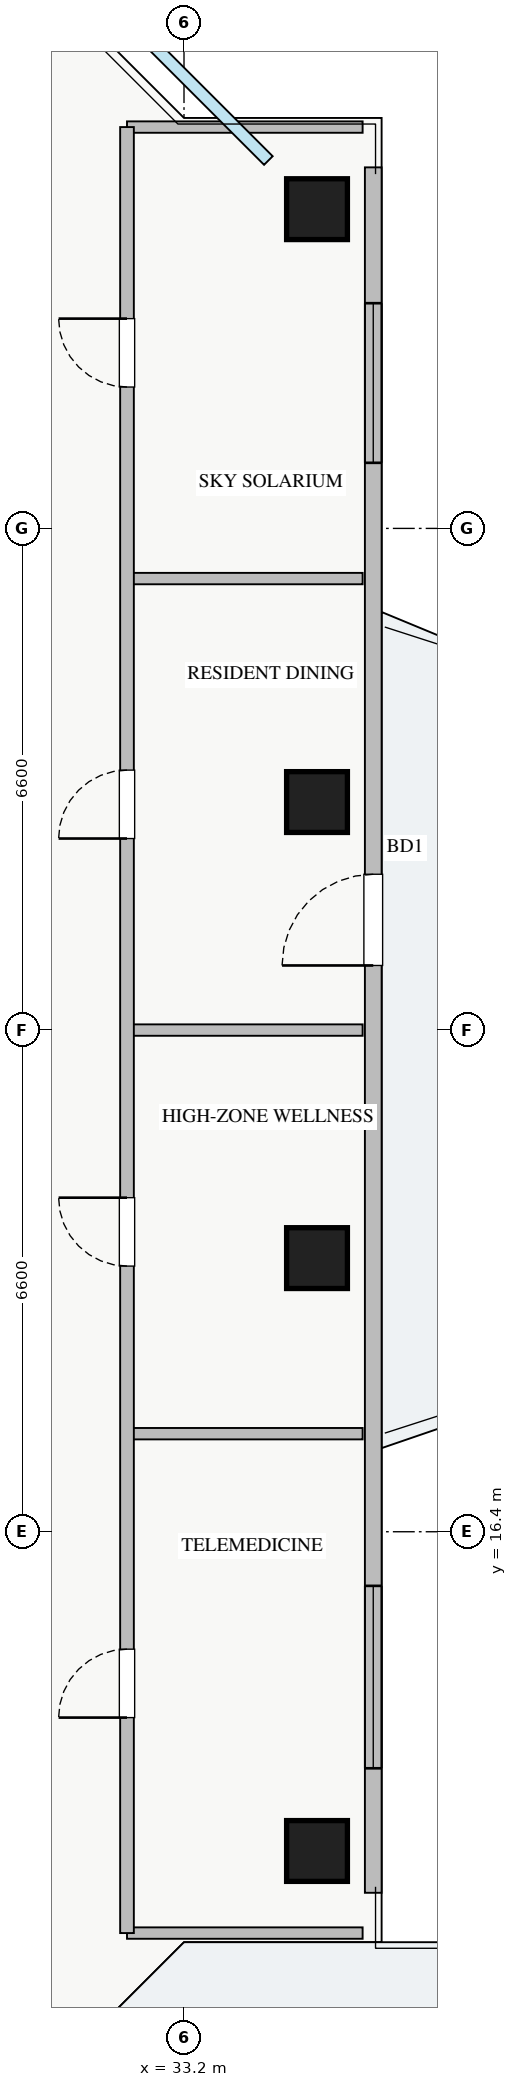
"""IFC4 building model, lengths in metres.
Left out: names, types, materials, properties, quantities, classifications, styles, units other than length and angle.
Written with IfcOpenShell. Run it as: python <this file> out.ifc"""

import sys

from ifc_helpers import new_model, si_unit, direction, frame, frame_2d, origin, origin_2d, place, context, subcontext, project, spatial, rectangle, extrude, source, transform, mapped, element, fill, save


model = new_model("IFC4")
c1 = context("Model", 3, precision=1e-05, world=origin(), true_north=direction((0.0, 1.0)))
c2 = subcontext(c1, "Body", "Model", "MODEL_VIEW")
j1 = project(units=[si_unit("LENGTHUNIT", "METRE"), si_unit("PLANEANGLEUNIT", "RADIAN")], contexts=[c1])
p1 = place(None, origin())
s1 = spatial("IfcSite", under=j1, at=p1, CompositionType="ELEMENT")
p2 = place(p1, origin())
s2 = spatial("IfcBuilding", under=s1, at=p2, CompositionType="ELEMENT")
p3 = place(p2, frame((0.0, 0.0, 213.25)))
s3 = spatial("IfcBuildingStorey", under=s2, at=p3, CompositionType="ELEMENT", Elevation=213.25)
m1 = source(origin(), c2, "Body", "SweptSolid", [
    extrude(rectangle(XDim=0.8, YDim=0.8, at=origin_2d()), origin(), (0.0, 0.0, 1.0), 3.25),
])
for number, where, z_axis, x_axis in (
    (1, (34.95, 12.2, 0.0), (0.0, 0.0, 1.0), (1.0, 0.0, 0.0)),
    (2, (34.95, 20.0, 0.0), (0.0, 0.0, 1.0), (1.0, 0.0, 0.0)),
    (3, (34.95, 26.0, 0.0), (0.0, 0.0, 1.0), (1.0, 0.0, 0.0)),
    (4, (34.95, 33.8, 0.0), (0.0, 0.0, 1.0), (1.0, 0.0, 0.0)),
):
    element("IfcColumn", number, at=place(p3, frame(where, z_axis=z_axis, x_axis=x_axis)), inside=s3, PredefinedType="COLUMN", context=c2, shape_type="MappedRepresentation", body=[
        mapped(m1, transform((0.0, 0.0, 0.0), x_axis=(1.0, 0.0, 0.0), y_axis=(0.0, 1.0, 0.0), z_axis=(0.0, 0.0, 1.0), scale=1.0)),
    ])
p4 = place(p3, frame((35.69, 11.65, 0.0), z_axis=(0.0, 0.0, 1.0), x_axis=(0.0, 1.0, 0.0)))
e5 = element("IfcWall", 5, at=p4, inside=s3, PredefinedType="STANDARD", context=c2, shape_type="SweptSolid", body=[
    extrude(rectangle(XDim=22.7, YDim=0.22, at=frame_2d((11.35, 0.0))), origin(), (0.0, 0.0, 1.0), 2.61),
])
p5 = place(p4, frame((12.2, 0.0, 0.0)))
e6 = element("IfcOpeningElement", 6, at=p5, cuts=e5, PredefinedType="OPENING", context=c2, shape_type="SweptSolid", body=[
    extrude(rectangle(XDim=1.2, YDim=2.1, at=frame_2d((0.6, 1.05))), frame((0.0, 0.12, 0.0), z_axis=(0.0, -1.0, 0.0), x_axis=(1.0, 0.0, 0.0)), (0.0, 0.0, 1.0), 0.24),
])
p6 = place(p4, frame((1.638, 0.0, 0.9)))
e7 = element("IfcOpeningElement", 7, at=p6, cuts=e5, PredefinedType="OPENING", context=c2, shape_type="SweptSolid", body=[
    extrude(rectangle(XDim=2.4, YDim=1.48, at=frame_2d((1.2, 0.74))), frame((0.0, 0.12, 0.0), z_axis=(0.0, -1.0, 0.0), x_axis=(1.0, 0.0, 0.0)), (0.0, 0.0, 1.0), 0.24),
])
p7 = place(p4, frame((18.813, 0.0, 0.9)))
e8 = element("IfcOpeningElement", 8, at=p7, cuts=e5, PredefinedType="OPENING", context=c2, shape_type="SweptSolid", body=[
    extrude(rectangle(XDim=2.1, YDim=1.48, at=frame_2d((1.05, 0.74))), frame((0.0, 0.12, 0.0), z_axis=(0.0, -1.0, 0.0), x_axis=(1.0, 0.0, 0.0)), (0.0, 0.0, 1.0), 0.24),
])
for number, where, z_axis, x_axis in (
    (9, (32.45, 34.88, 0.0), (0.0, 0.0, 1.0), (1.0, 0.0, 0.0)),
    (10, (32.45, 11.12, 0.0), (0.0, 0.0, 1.0), (1.0, 0.0, 0.0)),
    (11, (32.45, 17.69, 0.0), (0.0, 0.0, 1.0), (1.0, 0.0, 0.0)),
    (12, (32.45, 23.0, 0.0), (0.0, 0.0, 1.0), (1.0, 0.0, 0.0)),
    (13, (32.45, 28.94, 0.0), (0.0, 0.0, 1.0), (1.0, 0.0, 0.0)),
):
    element("IfcWall", number, at=place(p3, frame(where, z_axis=z_axis, x_axis=x_axis)), inside=s3, PredefinedType="PARTITIONING", context=c2, shape_type="SweptSolid", body=[
        extrude(rectangle(XDim=3.1, YDim=0.15, at=frame_2d((1.55, 0.0))), origin(), (0.0, 0.0, 1.0), 3.07),
    ])
p8 = place(p3, frame((32.45, 11.12, 0.0), z_axis=(0.0, 0.0, 1.0), x_axis=(0.0, 1.0, 0.0)))
e14 = element("IfcWall", 14, at=p8, inside=s3, PredefinedType="PARTITIONING", context=c2, shape_type="SweptSolid", body=[
    extrude(rectangle(XDim=23.76, YDim=0.18, at=frame_2d((11.88, 0.0))), origin(), (0.0, 0.0, 1.0), 3.07),
])
p9 = place(p8, frame((2.835, 0.0, 0.0)))
e15 = element("IfcOpeningElement", 15, at=p9, cuts=e14, PredefinedType="OPENING", context=c2, shape_type="SweptSolid", body=[
    extrude(rectangle(XDim=0.9, YDim=2.05, at=frame_2d((0.45, 1.025))), frame((0.0, 0.1, 0.0), z_axis=(0.0, -1.0, 0.0), x_axis=(1.0, 0.0, 0.0)), (0.0, 0.0, 1.0), 0.2),
])
p10 = place(p8, frame((8.775, 0.0, 0.0)))
e16 = element("IfcOpeningElement", 16, at=p10, cuts=e14, PredefinedType="OPENING", context=c2, shape_type="SweptSolid", body=[
    extrude(rectangle(XDim=0.9, YDim=2.05, at=frame_2d((0.45, 1.025))), frame((0.0, 0.1, 0.0), z_axis=(0.0, -1.0, 0.0), x_axis=(1.0, 0.0, 0.0)), (0.0, 0.0, 1.0), 0.2),
])
p11 = place(p8, frame((14.4, 0.0, 0.0)))
e17 = element("IfcOpeningElement", 17, at=p11, cuts=e14, PredefinedType="OPENING", context=c2, shape_type="SweptSolid", body=[
    extrude(rectangle(XDim=0.9, YDim=2.05, at=frame_2d((0.45, 1.025))), frame((0.0, 0.1, 0.0), z_axis=(0.0, -1.0, 0.0), x_axis=(1.0, 0.0, 0.0)), (0.0, 0.0, 1.0), 0.2),
])
p12 = place(p8, frame((20.34, 0.0, 0.0)))
e18 = element("IfcOpeningElement", 18, at=p12, cuts=e14, PredefinedType="OPENING", context=c2, shape_type="SweptSolid", body=[
    extrude(rectangle(XDim=0.9, YDim=2.05, at=frame_2d((0.45, 1.025))), frame((0.0, 0.1, 0.0), z_axis=(0.0, -1.0, 0.0), x_axis=(1.0, 0.0, 0.0)), (0.0, 0.0, 1.0), 0.2),
])
m2 = source(origin(), c2, "Body", "SweptSolid", [
    extrude(rectangle(XDim=1.2, YDim=2.1, at=frame_2d((0.6, 1.05))), frame((0.0, 0.025, 0.0), z_axis=(0.0, -1.0, 0.0), x_axis=(1.0, 0.0, 0.0)), (0.0, 0.0, 1.0), 0.05),
])
p13 = place(p5, origin())
e19 = element("IfcDoor", 19, at=p13, inside=s3, OperationType="SINGLE_SWING_LEFT", PredefinedType="DOOR", context=c2, shape_type="MappedRepresentation", body=[
    mapped(m2, transform((0.0, 0.0, 0.0), x_axis=(1.0, 0.0, 0.0), y_axis=(0.0, 1.0, 0.0), z_axis=(0.0, 0.0, 1.0), scale=1.0)),
])
fill(e6, e19)
m3 = source(origin(), c2, "Body", "SweptSolid", [
    extrude(rectangle(XDim=2.4, YDim=1.48, at=frame_2d((1.2, 0.74))), frame((0.0, 0.03, 0.0), z_axis=(0.0, -1.0, 0.0), x_axis=(1.0, 0.0, 0.0)), (0.0, 0.0, 1.0), 0.06),
])
p14 = place(p6, origin())
e20 = element("IfcWindow", 20, at=p14, inside=s3, PartitioningType="TRIPLE_PANEL_VERTICAL", PredefinedType="WINDOW", context=c2, shape_type="MappedRepresentation", body=[
    mapped(m3, transform((0.0, 0.0, 0.0), x_axis=(1.0, 0.0, 0.0), y_axis=(0.0, 1.0, 0.0), z_axis=(0.0, 0.0, 1.0), scale=1.0)),
])
fill(e7, e20)
m4 = source(origin(), c2, "Body", "SweptSolid", [
    extrude(rectangle(XDim=2.1, YDim=1.48, at=frame_2d((1.05, 0.74))), frame((0.0, 0.03, 0.0), z_axis=(0.0, -1.0, 0.0), x_axis=(1.0, 0.0, 0.0)), (0.0, 0.0, 1.0), 0.06),
])
p15 = place(p7, origin())
e21 = element("IfcWindow", 21, at=p15, inside=s3, PartitioningType="TRIPLE_PANEL_VERTICAL", PredefinedType="WINDOW", context=c2, shape_type="MappedRepresentation", body=[
    mapped(m4, transform((0.0, 0.0, 0.0), x_axis=(1.0, 0.0, 0.0), y_axis=(0.0, 1.0, 0.0), z_axis=(0.0, 0.0, 1.0), scale=1.0)),
])
fill(e8, e21)
m5 = source(origin(), c2, "Body", "SweptSolid", [
    extrude(rectangle(XDim=0.9, YDim=2.05, at=frame_2d((0.45, 1.025))), frame((0.0, 0.025, 0.0), z_axis=(0.0, -1.0, 0.0), x_axis=(1.0, 0.0, 0.0)), (0.0, 0.0, 1.0), 0.05),
])
p16 = place(p9, origin())
e22 = element("IfcDoor", 22, at=p16, inside=s3, OperationType="SINGLE_SWING_LEFT", PredefinedType="DOOR", context=c2, shape_type="MappedRepresentation", body=[
    mapped(m5, transform((0.0, 0.0, 0.0), x_axis=(1.0, 0.0, 0.0), y_axis=(0.0, 1.0, 0.0), z_axis=(0.0, 0.0, 1.0), scale=1.0)),
])
fill(e15, e22)
p17 = place(p10, origin())
e23 = element("IfcDoor", 23, at=p17, inside=s3, OperationType="SINGLE_SWING_RIGHT", PredefinedType="DOOR", context=c2, shape_type="MappedRepresentation", body=[
    mapped(m5, transform((0.0, 0.0, 0.0), x_axis=(1.0, 0.0, 0.0), y_axis=(0.0, 1.0, 0.0), z_axis=(0.0, 0.0, 1.0), scale=1.0)),
])
fill(e16, e23)
p18 = place(p11, origin())
e24 = element("IfcDoor", 24, at=p18, inside=s3, OperationType="SINGLE_SWING_LEFT", PredefinedType="DOOR", context=c2, shape_type="MappedRepresentation", body=[
    mapped(m5, transform((0.0, 0.0, 0.0), x_axis=(1.0, 0.0, 0.0), y_axis=(0.0, 1.0, 0.0), z_axis=(0.0, 0.0, 1.0), scale=1.0)),
])
fill(e17, e24)
p19 = place(p12, origin())
e25 = element("IfcDoor", 25, at=p19, inside=s3, OperationType="SINGLE_SWING_RIGHT", PredefinedType="DOOR", context=c2, shape_type="MappedRepresentation", body=[
    mapped(m5, transform((0.0, 0.0, 0.0), x_axis=(1.0, 0.0, 0.0), y_axis=(0.0, 1.0, 0.0), z_axis=(0.0, 0.0, 1.0), scale=1.0)),
])
fill(e18, e25)
save(model, sys.argv[1])
